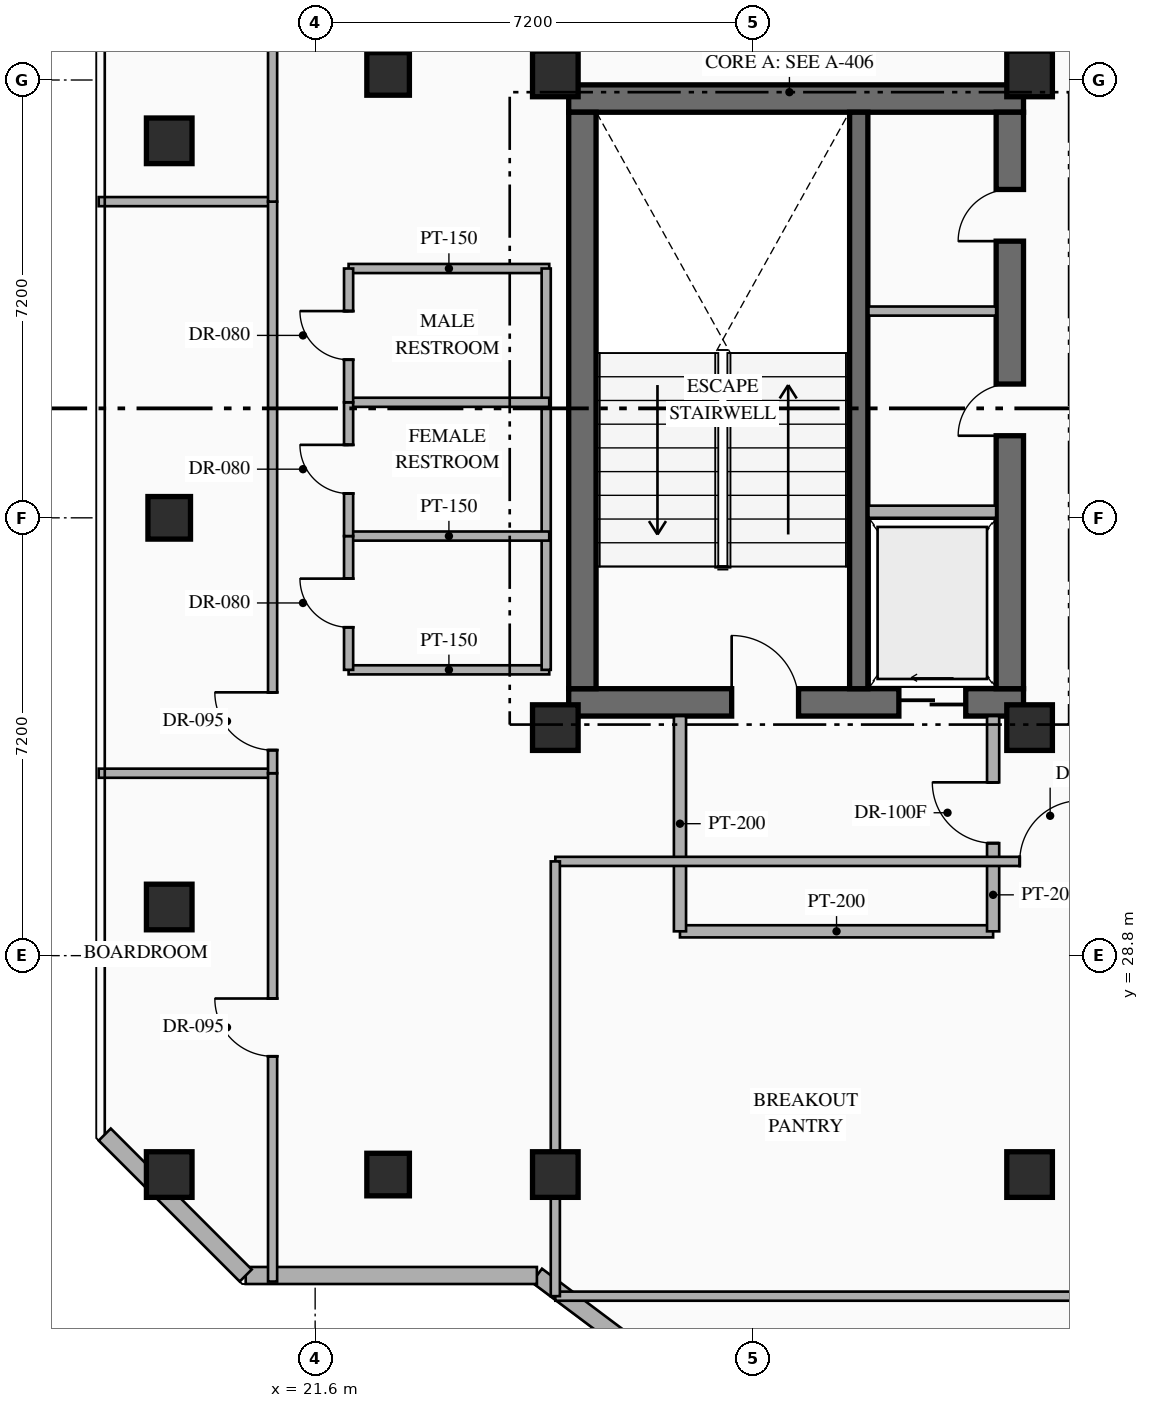
"""IFC4 building model, lengths in metres.
Left out: names, types, materials, properties, quantities, classifications, styles, units other than length and angle.
Written with IfcOpenShell. Run it as: python <this file> out.ifc"""

import sys

from ifc_helpers import new_model, si_unit, direction, frame, frame_2d, origin, origin_2d, place, context, subcontext, project, spatial, rectangle, hollow_rectangle, extrude, element, fill, save


model = new_model("IFC4")
c1 = context("Model", 3, precision=1e-05, world=origin(), true_north=direction((0.0, 1.0)))
c2 = subcontext(c1, "Body", "Model", "MODEL_VIEW")
j1 = project(units=[si_unit("LENGTHUNIT", "METRE"), si_unit("PLANEANGLEUNIT", "RADIAN")], contexts=[c1])
p1 = place(None, origin())
s1 = spatial("IfcSite", under=j1, at=p1, CompositionType="ELEMENT")
p2 = place(p1, origin())
s2 = spatial("IfcBuilding", under=s1, at=p2, CompositionType="ELEMENT")
p3 = place(p2, frame((0.0, 0.0, 202.35)))
s3 = spatial("IfcBuildingStorey", under=s2, at=p3, CompositionType="ELEMENT", Elevation=202.35)
p4 = place(p3, frame((25.77, 32.965, 0.0), z_axis=(0.0, 0.0, 1.0), x_axis=(1.0, 0.0, 0.0)))
e1 = element("IfcWall", 1, at=p4, inside=s3, PredefinedType="SHEAR", context=c2, shape_type="SweptSolid", body=[
    extrude(rectangle(XDim=7.48, YDim=0.45, at=frame_2d((3.74, 0.0))), origin(), (0.0, 0.0, 1.0), 3.6),
])
p5 = place(p4, frame((2.68, 0.0, 0.0)))
e2 = element("IfcOpeningElement", 2, at=p5, cuts=e1, PredefinedType="OPENING", context=c2, shape_type="SweptSolid", body=[
    extrude(rectangle(XDim=1.1, YDim=2.2, at=frame_2d((0.55, 1.1))), frame((0.0, 0.235, 0.0), z_axis=(0.0, -1.0, 0.0), x_axis=(1.0, 0.0, 0.0)), (0.0, 0.0, 1.0), 0.47),
])
p6 = place(p4, frame((5.43, 0.0, 0.0)))
e3 = element("IfcOpeningElement", 3, at=p6, cuts=e1, PredefinedType="OPENING", context=c2, shape_type="SweptSolid", body=[
    extrude(rectangle(XDim=1.1, YDim=2.15, at=frame_2d((0.55, 1.075))), frame((0.0, 0.235, 0.0), z_axis=(0.0, -1.0, 0.0), x_axis=(1.0, 0.0, 0.0)), (0.0, 0.0, 1.0), 0.47),
])
p7 = place(p3, frame((25.77, 42.895, 0.0), z_axis=(0.0, 0.0, 1.0), x_axis=(1.0, 0.0, 0.0)))
e4 = element("IfcWall", 4, at=p7, inside=s3, PredefinedType="SHEAR", context=c2, shape_type="SweptSolid", body=[
    extrude(rectangle(XDim=7.48, YDim=0.45, at=frame_2d((3.74, 0.0))), origin(), (0.0, 0.0, 1.0), 3.6),
])
p8 = place(p3, frame((25.995, 33.19, 0.0), z_axis=(0.0, 0.0, 1.0), x_axis=(0.0, 1.0, 0.0)))
e5 = element("IfcWall", 5, at=p8, inside=s3, PredefinedType="SHEAR", context=c2, shape_type="SweptSolid", body=[
    extrude(rectangle(XDim=9.48, YDim=0.45, at=frame_2d((4.74, 0.0))), origin(), (0.0, 0.0, 1.0), 3.6),
])
p9 = place(p3, frame((33.025, 33.19, 0.0), z_axis=(0.0, 0.0, 1.0), x_axis=(0.0, 1.0, 0.0)))
e6 = element("IfcWall", 6, at=p9, inside=s3, PredefinedType="SHEAR", context=c2, shape_type="SweptSolid", body=[
    extrude(rectangle(XDim=9.48, YDim=0.45, at=frame_2d((4.74, 0.0))), origin(), (0.0, 0.0, 1.0), 3.6),
])
p10 = place(p9, frame((4.16, 0.0, 0.0)))
e7 = element("IfcOpeningElement", 7, at=p10, cuts=e6, PredefinedType="OPENING", context=c2, shape_type="SweptSolid", body=[
    extrude(rectangle(XDim=0.85, YDim=2.08, at=frame_2d((0.425, 1.04))), frame((0.0, 0.235, 0.0), z_axis=(0.0, -1.0, 0.0), x_axis=(1.0, 0.0, 0.0)), (0.0, 0.0, 1.0), 0.47),
])
p11 = place(p9, frame((7.36, 0.0, 0.0)))
e8 = element("IfcOpeningElement", 8, at=p11, cuts=e6, PredefinedType="OPENING", context=c2, shape_type="SweptSolid", body=[
    extrude(rectangle(XDim=0.85, YDim=2.08, at=frame_2d((0.425, 1.04))), frame((0.0, 0.235, 0.0), z_axis=(0.0, -1.0, 0.0), x_axis=(1.0, 0.0, 0.0)), (0.0, 0.0, 1.0), 0.47),
])
p12 = place(p3, frame((30.54, 33.19, 0.0), z_axis=(0.0, 0.0, 1.0), x_axis=(0.0, 1.0, 0.0)))
e9 = element("IfcWall", 9, at=p12, inside=s3, PredefinedType="SHEAR", context=c2, shape_type="SweptSolid", body=[
    extrude(rectangle(XDim=9.48, YDim=0.3, at=frame_2d((4.74, 0.0))), origin(), (0.0, 0.0, 1.0), 3.6),
])
for number, where, z_axis, x_axis in (
    (10, (25.55, 32.55, 0.0), (0.0, 0.0, 1.0), (1.0, 0.0, 0.0)),
    (11, (33.35, 32.55, 0.0), (0.0, 0.0, 1.0), (1.0, 0.0, 0.0)),
    (12, (25.55, 43.3, 0.0), (0.0, 0.0, 1.0), (1.0, 0.0, 0.0)),
    (13, (33.35, 43.3, 0.0), (0.0, 0.0, 1.0), (1.0, 0.0, 0.0)),
    (14, (25.55, 25.2, 0.0), (0.0, 0.0, 1.0), (1.0, 0.0, 0.0)),
    (15, (33.35, 25.2, 0.0), (0.0, 0.0, 1.0), (1.0, 0.0, 0.0)),
    (16, (19.2, 25.2, 0.0), (0.0, 0.0, 1.0), (1.0, 0.0, 0.0)),
    (17, (19.2, 29.6, 0.0), (0.0, 0.0, 1.0), (1.0, 0.0, 0.0)),
    (18, (19.2, 42.2, 0.0), (0.0, 0.0, 1.0), (1.0, 0.0, 0.0)),
):
    element("IfcColumn", number, at=place(p3, frame(where, z_axis=z_axis, x_axis=x_axis)), inside=s3, PredefinedType="COLUMN", context=c2, shape_type="SweptSolid", body=[
        extrude(hollow_rectangle(XDim=0.75, YDim=0.75, WallThickness=0.028, at=origin_2d()), origin(), (0.0, 0.0, 1.0), 3.6),
    ])
for number, where, z_axis, x_axis in (
    (19, (22.8, 25.2, 0.0), (0.0, 0.0, 1.0), (1.0, 0.0, 0.0)),
    (20, (22.8, 43.3, 0.0), (0.0, 0.0, 1.0), (1.0, 0.0, 0.0)),
    (21, (19.2, 36.0, 0.0), (0.0, 0.0, 1.0), (1.0, 0.0, 0.0)),
):
    element("IfcColumn", number, at=place(p3, frame(where, z_axis=z_axis, x_axis=x_axis)), inside=s3, PredefinedType="COLUMN", context=c2, shape_type="SweptSolid", body=[
        extrude(hollow_rectangle(XDim=0.7, YDim=0.7, WallThickness=0.028, at=origin_2d()), origin(), (0.0, 0.0, 1.0), 3.6),
    ])
p13 = place(p3, frame((44.918, 8.787, 0.0), z_axis=(0.0, 0.0, 1.0), x_axis=(-0.800004765927, 0.599993645378, 0.0)))
e22 = element("IfcWall", 22, at=p13, inside=s3, PredefinedType="STANDARD", context=c2, shape_type="SweptSolid", body=[
    extrude(rectangle(XDim=24.588, YDim=0.28, at=frame_2d((12.294, 0.0))), origin(), (0.0, 0.0, 1.0), 3.35),
])
p14 = place(p3, frame((25.247, 23.54, 0.0), z_axis=(0.0, 0.0, 1.0), x_axis=(-1.0, 0.0, 0.0)))
e23 = element("IfcWall", 23, at=p14, inside=s3, PredefinedType="STANDARD", context=c2, shape_type="SweptSolid", body=[
    extrude(rectangle(XDim=4.789, YDim=0.28, at=frame_2d((2.395, 0.0))), origin(), (0.0, 0.0, 1.0), 3.35),
])
p15 = place(p3, frame((20.458, 23.54, 0.0), z_axis=(0.0, 0.0, 1.0), x_axis=(-0.707144017911, 0.707069542501, 0.0)))
e24 = element("IfcWall", 24, at=p15, inside=s3, PredefinedType="STANDARD", context=c2, shape_type="SweptSolid", body=[
    extrude(rectangle(XDim=3.278, YDim=0.28, at=frame_2d((1.639, 0.0))), origin(), (0.0, 0.0, 1.0), 3.35),
])
p16 = place(p3, frame((30.7, 36.1, 0.0), z_axis=(0.0, 0.0, 1.0), x_axis=(1.0, 0.0, 0.0)))
e25 = element("IfcWall", 25, at=p16, inside=s3, PredefinedType="STANDARD", context=c2, shape_type="SweptSolid", body=[
    extrude(rectangle(XDim=2.1, YDim=0.2, at=frame_2d((1.05, 0.0))), origin(), (0.0, 0.0, 1.0), 3.35),
])
p17 = place(p3, frame((30.7, 39.4, 0.0), z_axis=(0.0, 0.0, 1.0), x_axis=(1.0, 0.0, 0.0)))
e26 = element("IfcWall", 26, at=p17, inside=s3, PredefinedType="PARTITIONING", context=c2, shape_type="SweptSolid", body=[
    extrude(rectangle(XDim=2.1, YDim=0.15, at=frame_2d((1.05, 0.0))), origin(), (0.0, 0.0, 1.0), 3.35),
])
p18 = place(p3, frame((27.6, 29.2, 0.0), z_axis=(0.0, 0.0, 1.0), x_axis=(1.0, 0.0, 0.0)))
e27 = element("IfcWall", 27, at=p18, inside=s3, PredefinedType="STANDARD", context=c2, shape_type="SweptSolid", body=[
    extrude(rectangle(XDim=5.15, YDim=0.2, at=frame_2d((2.575, 0.0))), origin(), (0.0, 0.0, 1.0), 3.35),
])
p19 = place(p3, frame((27.6, 29.2, 0.0), z_axis=(0.0, 0.0, 1.0), x_axis=(0.0, 1.0, 0.0)))
e28 = element("IfcWall", 28, at=p19, inside=s3, PredefinedType="STANDARD", context=c2, shape_type="SweptSolid", body=[
    extrude(rectangle(XDim=3.54, YDim=0.2, at=frame_2d((1.77, 0.0))), origin(), (0.0, 0.0, 1.0), 3.35),
])
p20 = place(p3, frame((32.75, 29.2, 0.0), z_axis=(0.0, 0.0, 1.0), x_axis=(0.0, 1.0, 0.0)))
e29 = element("IfcWall", 29, at=p20, inside=s3, PredefinedType="STANDARD", context=c2, shape_type="SweptSolid", body=[
    extrude(rectangle(XDim=3.54, YDim=0.2, at=frame_2d((1.77, 0.0))), origin(), (0.0, 0.0, 1.0), 3.35),
])
p21 = place(p20, frame((1.45, 0.0, 0.0)))
e30 = element("IfcOpeningElement", 30, at=p21, cuts=e29, PredefinedType="OPENING", context=c2, shape_type="SweptSolid", body=[
    extrude(rectangle(XDim=1.0, YDim=2.2, at=frame_2d((0.5, 1.1))), frame((0.0, 0.11, 0.0), z_axis=(0.0, -1.0, 0.0), x_axis=(1.0, 0.0, 0.0)), (0.0, 0.0, 1.0), 0.22),
])
for number, where, z_axis, x_axis in (
    (31, (22.15, 33.5, 0.0), (0.0, 0.0, 1.0), (1.0, 0.0, 0.0)),
    (32, (22.15, 40.1, 0.0), (0.0, 0.0, 1.0), (1.0, 0.0, 0.0)),
):
    element("IfcWall", number, at=place(p3, frame(where, z_axis=z_axis, x_axis=x_axis)), inside=s3, PredefinedType="PARTITIONING", context=c2, shape_type="SweptSolid", body=[
        extrude(rectangle(XDim=3.3, YDim=0.15, at=frame_2d((1.65, 0.0))), origin(), (0.0, 0.0, 1.0), 3.35),
    ])
p22 = place(p3, frame((25.4, 33.5, 0.0), z_axis=(0.0, 0.0, 1.0), x_axis=(0.0, 1.0, 0.0)))
e33 = element("IfcWall", 33, at=p22, inside=s3, PredefinedType="PARTITIONING", context=c2, shape_type="SweptSolid", body=[
    extrude(rectangle(XDim=6.6, YDim=0.15, at=frame_2d((3.3, 0.0))), origin(), (0.0, 0.0, 1.0), 3.35),
])
for number, where, z_axis, x_axis in (
    (34, (22.15, 35.7, 0.0), (0.0, 0.0, 1.0), (1.0, 0.0, 0.0)),
    (35, (22.15, 37.9, 0.0), (0.0, 0.0, 1.0), (1.0, 0.0, 0.0)),
):
    element("IfcWall", number, at=place(p3, frame(where, z_axis=z_axis, x_axis=x_axis)), inside=s3, PredefinedType="PARTITIONING", context=c2, shape_type="SweptSolid", body=[
        extrude(rectangle(XDim=3.3, YDim=0.15, at=frame_2d((1.65, 0.0))), origin(), (0.0, 0.0, 1.0), 3.35),
    ])
p23 = place(p3, frame((22.15, 33.5, 0.0), z_axis=(0.0, 0.0, 1.0), x_axis=(0.0, 1.0, 0.0)))
e36 = element("IfcWall", 36, at=p23, inside=s3, PredefinedType="PARTITIONING", context=c2, shape_type="SweptSolid", body=[
    extrude(rectangle(XDim=2.2, YDim=0.15, at=frame_2d((1.1, 0.0))), origin(), (0.0, 0.0, 1.0), 3.35),
])
p24 = place(p23, frame((0.7, 0.0, 0.0)))
e37 = element("IfcOpeningElement", 37, at=p24, cuts=e36, PredefinedType="OPENING", context=c2, shape_type="SweptSolid", body=[
    extrude(rectangle(XDim=0.8, YDim=2.06, at=frame_2d((0.4, 1.03))), frame((0.0, 0.085, 0.0), z_axis=(0.0, -1.0, 0.0), x_axis=(1.0, 0.0, 0.0)), (0.0, 0.0, 1.0), 0.17),
])
p25 = place(p3, frame((22.15, 35.7, 0.0), z_axis=(0.0, 0.0, 1.0), x_axis=(0.0, 1.0, 0.0)))
e38 = element("IfcWall", 38, at=p25, inside=s3, PredefinedType="PARTITIONING", context=c2, shape_type="SweptSolid", body=[
    extrude(rectangle(XDim=2.2, YDim=0.15, at=frame_2d((1.1, 0.0))), origin(), (0.0, 0.0, 1.0), 3.35),
])
p26 = place(p25, frame((0.7, 0.0, 0.0)))
e39 = element("IfcOpeningElement", 39, at=p26, cuts=e38, PredefinedType="OPENING", context=c2, shape_type="SweptSolid", body=[
    extrude(rectangle(XDim=0.8, YDim=2.06, at=frame_2d((0.4, 1.03))), frame((0.0, 0.085, 0.0), z_axis=(0.0, -1.0, 0.0), x_axis=(1.0, 0.0, 0.0)), (0.0, 0.0, 1.0), 0.17),
])
p27 = place(p3, frame((22.15, 37.9, 0.0), z_axis=(0.0, 0.0, 1.0), x_axis=(0.0, 1.0, 0.0)))
e40 = element("IfcWall", 40, at=p27, inside=s3, PredefinedType="PARTITIONING", context=c2, shape_type="SweptSolid", body=[
    extrude(rectangle(XDim=2.2, YDim=0.15, at=frame_2d((1.1, 0.0))), origin(), (0.0, 0.0, 1.0), 3.35),
])
p28 = place(p27, frame((0.7, 0.0, 0.0)))
e41 = element("IfcOpeningElement", 41, at=p28, cuts=e40, PredefinedType="OPENING", context=c2, shape_type="SweptSolid", body=[
    extrude(rectangle(XDim=0.8, YDim=2.06, at=frame_2d((0.4, 1.03))), frame((0.0, 0.085, 0.0), z_axis=(0.0, -1.0, 0.0), x_axis=(1.0, 0.0, 0.0)), (0.0, 0.0, 1.0), 0.17),
])
p29 = place(p3, frame((25.55, 23.2, 0.0), z_axis=(0.0, 0.0, 1.0), x_axis=(1.0, 0.0, 0.0)))
e42 = element("IfcWall", 42, at=p29, inside=s3, PredefinedType="PARTITIONING", context=c2, shape_type="SweptSolid", body=[
    extrude(rectangle(XDim=9.4, YDim=0.15, at=frame_2d((4.7, 0.0))), origin(), (0.0, 0.0, 1.0), 3.35),
])
p30 = place(p3, frame((25.55, 30.35, 0.0), z_axis=(0.0, 0.0, 1.0), x_axis=(1.0, 0.0, 0.0)))
e43 = element("IfcWall", 43, at=p30, inside=s3, PredefinedType="PARTITIONING", context=c2, shape_type="SweptSolid", body=[
    extrude(rectangle(XDim=9.4, YDim=0.15, at=frame_2d((4.7, 0.0))), origin(), (0.0, 0.0, 1.0), 3.35),
])
p31 = place(p30, frame((7.638, 0.0, 0.0)))
e44 = element("IfcOpeningElement", 44, at=p31, cuts=e43, PredefinedType="OPENING", context=c2, shape_type="SweptSolid", body=[
    extrude(rectangle(XDim=1.0, YDim=2.15, at=frame_2d((0.5, 1.075))), frame((0.0, 0.085, 0.0), z_axis=(0.0, -1.0, 0.0), x_axis=(1.0, 0.0, 0.0)), (0.0, 0.0, 1.0), 0.17),
])
p32 = place(p3, frame((25.55, 23.2, 0.0), z_axis=(0.0, 0.0, 1.0), x_axis=(0.0, 1.0, 0.0)))
e45 = element("IfcWall", 45, at=p32, inside=s3, PredefinedType="PARTITIONING", context=c2, shape_type="SweptSolid", body=[
    extrude(rectangle(XDim=7.15, YDim=0.15, at=frame_2d((3.575, 0.0))), origin(), (0.0, 0.0, 1.0), 2.757),
])
p33 = place(p3, frame((18.04, 31.8, 0.0), z_axis=(0.0, 0.0, 1.0), x_axis=(1.0, 0.0, 0.0)))
e46 = element("IfcWall", 46, at=p33, inside=s3, PredefinedType="PARTITIONING", context=c2, shape_type="SweptSolid", body=[
    extrude(rectangle(XDim=2.86, YDim=0.15, at=frame_2d((1.43, 0.0))), origin(), (0.0, 0.0, 1.0), 3.35),
])
p34 = place(p3, frame((20.9, 23.44, 0.0), z_axis=(0.0, 0.0, 1.0), x_axis=(0.0, 1.0, 0.0)))
e47 = element("IfcWall", 47, at=p34, inside=s3, PredefinedType="PARTITIONING", context=c2, shape_type="SweptSolid", body=[
    extrude(rectangle(XDim=8.36, YDim=0.15, at=frame_2d((4.18, 0.0))), origin(), (0.0, 0.0, 1.0), 3.35),
])
p35 = place(p34, frame((3.705, 0.0, 0.0)))
e48 = element("IfcOpeningElement", 48, at=p35, cuts=e47, PredefinedType="OPENING", context=c2, shape_type="SweptSolid", body=[
    extrude(rectangle(XDim=0.95, YDim=2.15, at=frame_2d((0.475, 1.075))), frame((0.0, 0.085, 0.0), z_axis=(0.0, -1.0, 0.0), x_axis=(1.0, 0.0, 0.0)), (0.0, 0.0, 1.0), 0.17),
])
p36 = place(p3, frame((18.04, 41.2, 0.0), z_axis=(0.0, 0.0, 1.0), x_axis=(1.0, 0.0, 0.0)))
e49 = element("IfcWall", 49, at=p36, inside=s3, PredefinedType="PARTITIONING", context=c2, shape_type="SweptSolid", body=[
    extrude(rectangle(XDim=2.86, YDim=0.15, at=frame_2d((1.43, 0.0))), origin(), (0.0, 0.0, 1.0), 3.35),
])
p37 = place(p3, frame((20.9, 31.8, 0.0), z_axis=(0.0, 0.0, 1.0), x_axis=(0.0, 1.0, 0.0)))
e50 = element("IfcWall", 50, at=p37, inside=s3, PredefinedType="PARTITIONING", context=c2, shape_type="SweptSolid", body=[
    extrude(rectangle(XDim=9.4, YDim=0.15, at=frame_2d((4.7, 0.0))), origin(), (0.0, 0.0, 1.0), 3.35),
])
p38 = place(p37, frame((0.38, 0.0, 0.0)))
e51 = element("IfcOpeningElement", 51, at=p38, cuts=e50, PredefinedType="OPENING", context=c2, shape_type="SweptSolid", body=[
    extrude(rectangle(XDim=0.95, YDim=2.15, at=frame_2d((0.475, 1.075))), frame((0.0, 0.085, 0.0), z_axis=(0.0, -1.0, 0.0), x_axis=(1.0, 0.0, 0.0)), (0.0, 0.0, 1.0), 0.17),
])
p39 = place(p3, frame((20.9, 41.2, 0.0), z_axis=(0.0, 0.0, 1.0), x_axis=(0.0, 1.0, 0.0)))
e52 = element("IfcWall", 52, at=p39, inside=s3, PredefinedType="PARTITIONING", context=c2, shape_type="SweptSolid", body=[
    extrude(rectangle(XDim=9.16, YDim=0.15, at=frame_2d((4.58, 0.0))), origin(), (0.0, 0.0, 1.0), 3.35),
])
p40 = place(p39, frame((4.85, 0.0, 0.0)))
e53 = element("IfcOpeningElement", 53, at=p40, cuts=e52, PredefinedType="OPENING", context=c2, shape_type="SweptSolid", body=[
    extrude(rectangle(XDim=0.95, YDim=2.15, at=frame_2d((0.475, 1.075))), frame((0.0, 0.085, 0.0), z_axis=(0.0, -1.0, 0.0), x_axis=(1.0, 0.0, 0.0)), (0.0, 0.0, 1.0), 0.17),
])
p41 = place(p5, origin())
e54 = element("IfcDoor", 54, at=p41, inside=s3, OperationType="SINGLE_SWING_LEFT", PredefinedType="DOOR", context=c2, shape_type="SweptSolid", body=[
    extrude(rectangle(XDim=1.1, YDim=2.2, at=frame_2d((0.55, 1.1))), frame((0.0, 0.025, 0.0), z_axis=(0.0, -1.0, 0.0), x_axis=(1.0, 0.0, 0.0)), (0.0, 0.0, 1.0), 0.05),
])
fill(e2, e54)
p42 = place(p6, origin())
e55 = element("IfcDoor", 55, at=p42, inside=s3, OperationType="SLIDING_TO_LEFT", PredefinedType="USERDEFINED", context=c2, shape_type="SweptSolid", body=[
    extrude(rectangle(XDim=1.1, YDim=2.15, at=frame_2d((0.55, 1.075))), frame((0.0, 0.025, 0.0), z_axis=(0.0, -1.0, 0.0), x_axis=(1.0, 0.0, 0.0)), (0.0, 0.0, 1.0), 0.05),
])
fill(e3, e55)
p43 = place(p10, origin())
e56 = element("IfcDoor", 56, at=p43, inside=s3, OperationType="SINGLE_SWING_LEFT", PredefinedType="DOOR", context=c2, shape_type="SweptSolid", body=[
    extrude(rectangle(XDim=0.85, YDim=2.08, at=frame_2d((0.425, 1.04))), frame((0.0, 0.025, 0.0), z_axis=(0.0, -1.0, 0.0), x_axis=(1.0, 0.0, 0.0)), (0.0, 0.0, 1.0), 0.05),
])
fill(e7, e56)
p44 = place(p11, origin())
e57 = element("IfcDoor", 57, at=p44, inside=s3, OperationType="SINGLE_SWING_LEFT", PredefinedType="DOOR", context=c2, shape_type="SweptSolid", body=[
    extrude(rectangle(XDim=0.85, YDim=2.08, at=frame_2d((0.425, 1.04))), frame((0.0, 0.025, 0.0), z_axis=(0.0, -1.0, 0.0), x_axis=(1.0, 0.0, 0.0)), (0.0, 0.0, 1.0), 0.05),
])
fill(e8, e57)
p45 = place(p21, origin())
e58 = element("IfcDoor", 58, at=p45, inside=s3, OperationType="SINGLE_SWING_RIGHT", PredefinedType="DOOR", context=c2, shape_type="SweptSolid", body=[
    extrude(rectangle(XDim=1.0, YDim=2.2, at=frame_2d((0.5, 1.1))), frame((0.0, 0.025, 0.0), z_axis=(0.0, -1.0, 0.0), x_axis=(1.0, 0.0, 0.0)), (0.0, 0.0, 1.0), 0.05),
])
fill(e30, e58)
p46 = place(p24, origin())
e59 = element("IfcDoor", 59, at=p46, inside=s3, OperationType="SINGLE_SWING_RIGHT", PredefinedType="DOOR", context=c2, shape_type="SweptSolid", body=[
    extrude(rectangle(XDim=0.8, YDim=2.06, at=frame_2d((0.4, 1.03))), frame((0.0, 0.025, 0.0), z_axis=(0.0, -1.0, 0.0), x_axis=(1.0, 0.0, 0.0)), (0.0, 0.0, 1.0), 0.05),
])
fill(e37, e59)
p47 = place(p26, origin())
e60 = element("IfcDoor", 60, at=p47, inside=s3, OperationType="SINGLE_SWING_RIGHT", PredefinedType="DOOR", context=c2, shape_type="SweptSolid", body=[
    extrude(rectangle(XDim=0.8, YDim=2.06, at=frame_2d((0.4, 1.03))), frame((0.0, 0.025, 0.0), z_axis=(0.0, -1.0, 0.0), x_axis=(1.0, 0.0, 0.0)), (0.0, 0.0, 1.0), 0.05),
])
fill(e39, e60)
p48 = place(p28, origin())
e61 = element("IfcDoor", 61, at=p48, inside=s3, OperationType="SINGLE_SWING_RIGHT", PredefinedType="DOOR", context=c2, shape_type="SweptSolid", body=[
    extrude(rectangle(XDim=0.8, YDim=2.06, at=frame_2d((0.4, 1.03))), frame((0.0, 0.025, 0.0), z_axis=(0.0, -1.0, 0.0), x_axis=(1.0, 0.0, 0.0)), (0.0, 0.0, 1.0), 0.05),
])
fill(e41, e61)
p49 = place(p31, origin())
e62 = element("IfcDoor", 62, at=p49, inside=s3, OperationType="SINGLE_SWING_RIGHT", PredefinedType="DOOR", context=c2, shape_type="SweptSolid", body=[
    extrude(rectangle(XDim=1.0, YDim=2.15, at=frame_2d((0.5, 1.075))), frame((0.0, 0.025, 0.0), z_axis=(0.0, -1.0, 0.0), x_axis=(1.0, 0.0, 0.0)), (0.0, 0.0, 1.0), 0.05),
])
fill(e44, e62)
p50 = place(p35, origin())
e63 = element("IfcDoor", 63, at=p50, inside=s3, OperationType="SINGLE_SWING_RIGHT", PredefinedType="DOOR", context=c2, shape_type="SweptSolid", body=[
    extrude(rectangle(XDim=0.95, YDim=2.15, at=frame_2d((0.475, 1.075))), frame((0.0, 0.025, 0.0), z_axis=(0.0, -1.0, 0.0), x_axis=(1.0, 0.0, 0.0)), (0.0, 0.0, 1.0), 0.05),
])
fill(e48, e63)
p51 = place(p38, origin())
e64 = element("IfcDoor", 64, at=p51, inside=s3, OperationType="SINGLE_SWING_RIGHT", PredefinedType="DOOR", context=c2, shape_type="SweptSolid", body=[
    extrude(rectangle(XDim=0.95, YDim=2.15, at=frame_2d((0.475, 1.075))), frame((0.0, 0.025, 0.0), z_axis=(0.0, -1.0, 0.0), x_axis=(1.0, 0.0, 0.0)), (0.0, 0.0, 1.0), 0.05),
])
fill(e51, e64)
save(model, sys.argv[1])
